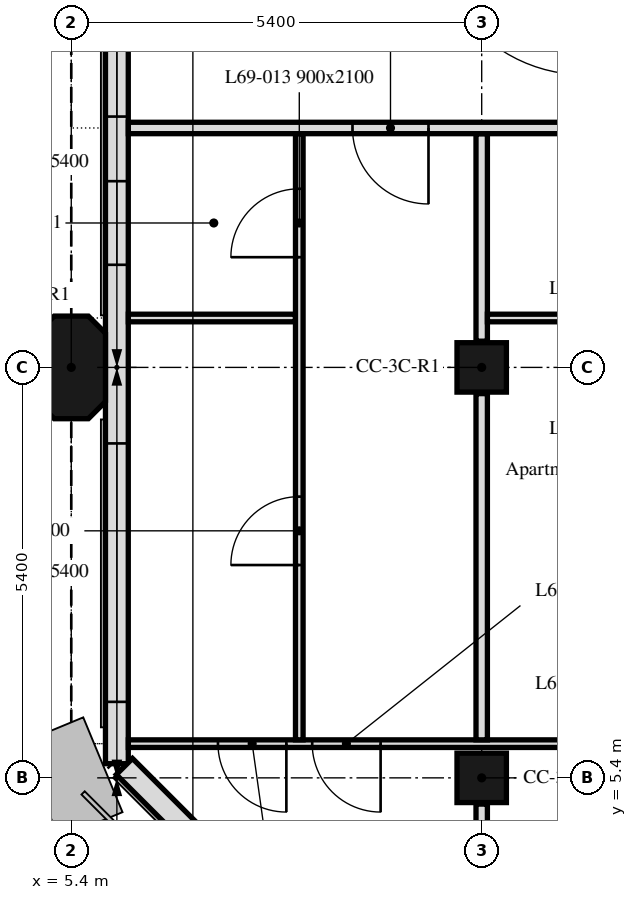
"""IFC4 building model, lengths in metres.
Left out: names, types, materials, properties, quantities, classifications, styles, units other than length and angle.
Written with IfcOpenShell. Run it as: python <this file> out.ifc"""

import sys

from ifc_helpers import new_model, si_unit, direction, frame, frame_2d, origin, origin_2d, place, context, subcontext, project, spatial, polyline, rectangle, outline, extrude, element, fill, save


model = new_model("IFC4")
c1 = context("Model", 3, precision=1e-05, world=origin(), true_north=direction((0.0, 1.0)))
c2 = subcontext(c1, "Body", "Model", "MODEL_VIEW")
j1 = project(units=[si_unit("LENGTHUNIT", "METRE"), si_unit("PLANEANGLEUNIT", "RADIAN")], contexts=[c1])
p1 = place(None, origin())
s1 = spatial("IfcSite", under=j1, at=p1, CompositionType="ELEMENT")
p2 = place(p1, origin())
s2 = spatial("IfcBuilding", under=s1, at=p2, CompositionType="ELEMENT")
p3 = place(p2, frame((0.0, 0.0, 281.8)))
s3 = spatial("IfcBuildingStorey", under=s2, at=p3, CompositionType="ELEMENT", Elevation=281.8)
p4 = place(p3, frame((10.8, 5.4, 0.0), z_axis=(0.0, 0.0, 1.0), x_axis=(1.0, 0.0, 0.0)))
e1 = element("IfcColumn", 1, at=p4, inside=s3, PredefinedType="COLUMN", context=c2, shape_type="SweptSolid", body=[
    extrude(rectangle(XDim=0.65, YDim=0.65, at=origin_2d()), origin(), (0.0, 0.0, 1.0), 3.0),
])
p5 = place(p3, frame((5.4, 10.8, 0.0), z_axis=(0.0, 0.0, 1.0), x_axis=(0.0, 1.0, 0.0)))
e2 = element("IfcColumn", 2, at=p5, inside=s3, PredefinedType="COLUMN", context=c2, shape_type="SweptSolid", body=[
    extrude(outline(polyline([(-0.45, -0.45), (0.45, -0.45), (0.675, -0.225), (0.675, 0.225), (0.45, 0.45), (-0.45, 0.45), (-0.675, 0.225), (-0.675, -0.225), (-0.45, -0.45)])), origin(), (0.0, 0.0, 1.0), 3.0),
])
p6 = place(p3, frame((10.8, 10.8, 0.0), z_axis=(0.0, 0.0, 1.0), x_axis=(1.0, 0.0, 0.0)))
e3 = element("IfcColumn", 3, at=p6, inside=s3, PredefinedType="COLUMN", context=c2, shape_type="SweptSolid", body=[
    extrude(rectangle(XDim=0.65, YDim=0.65, at=origin_2d()), origin(), (0.0, 0.0, 1.0), 3.0),
])
p7 = place(p3, frame((6.0, 16.2, 0.0), z_axis=(0.0, 0.0, 1.0), x_axis=(0.0, -1.0, 0.0)))
e4 = element("IfcWall", 4, at=p7, inside=s3, PredefinedType="SOLIDWALL", context=c2, shape_type="SweptSolid", body=[
    extrude(rectangle(XDim=10.614, YDim=0.3, at=frame_2d((5.307, 0.0))), origin(), (0.0, 0.0, 1.0), 3.0),
])
p8 = place(p7, frame((1.0, 0.0, 0.9)))
e5 = element("IfcOpeningElement", 5, at=p8, cuts=e4, PredefinedType="OPENING", context=c2, shape_type="SweptSolid", body=[
    extrude(rectangle(XDim=1.1, YDim=1.7, at=frame_2d((0.55, 0.85))), frame((0.0, 0.16, 0.0), z_axis=(0.0, -1.0, 0.0), x_axis=(1.0, 0.0, 0.0)), (0.0, 0.0, 1.0), 0.32),
])
p9 = place(p7, frame((2.95, 0.0, 0.9)))
e6 = element("IfcOpeningElement", 6, at=p9, cuts=e4, PredefinedType="OPENING", context=c2, shape_type="SweptSolid", body=[
    extrude(rectangle(XDim=1.1, YDim=1.7, at=frame_2d((0.55, 0.85))), frame((0.0, 0.16, 0.0), z_axis=(0.0, -1.0, 0.0), x_axis=(1.0, 0.0, 0.0)), (0.0, 0.0, 1.0), 0.32),
])
p10 = place(p7, frame((6.4, 0.0, 0.9)))
e7 = element("IfcOpeningElement", 7, at=p10, cuts=e4, PredefinedType="OPENING", context=c2, shape_type="SweptSolid", body=[
    extrude(rectangle(XDim=3.4, YDim=1.7, at=frame_2d((1.7, 0.85))), frame((0.0, 0.16, 0.0), z_axis=(0.0, -1.0, 0.0), x_axis=(1.0, 0.0, 0.0)), (0.0, 0.0, 1.0), 0.32),
])
p11 = place(p3, frame((6.099, 5.55, 0.0), z_axis=(0.0, 0.0, 1.0), x_axis=(0.707106781187, -0.707106781187, 0.0)))
e8 = element("IfcWall", 8, at=p11, inside=s3, PredefinedType="SOLIDWALL", context=c2, shape_type="SweptSolid", body=[
    extrude(rectangle(XDim=6.86, YDim=0.3, at=frame_2d((3.43, 0.0))), origin(), (0.0, 0.0, 1.0), 3.0),
])
p12 = place(p11, frame((1.28, 0.0, 0.9)))
e9 = element("IfcOpeningElement", 9, at=p12, cuts=e8, PredefinedType="OPENING", context=c2, shape_type="SweptSolid", body=[
    extrude(rectangle(XDim=1.1, YDim=1.7, at=frame_2d((0.55, 0.85))), frame((0.0, 0.16, 0.0), z_axis=(0.0, -1.0, 0.0), x_axis=(1.0, 0.0, 0.0)), (0.0, 0.0, 1.0), 0.32),
])
p13 = place(p11, frame((4.48, 0.0, 0.9)))
e10 = element("IfcOpeningElement", 10, at=p13, cuts=e8, PredefinedType="OPENING", context=c2, shape_type="SweptSolid", body=[
    extrude(rectangle(XDim=1.1, YDim=1.7, at=frame_2d((0.55, 0.85))), frame((0.0, 0.16, 0.0), z_axis=(0.0, -1.0, 0.0), x_axis=(1.0, 0.0, 0.0)), (0.0, 0.0, 1.0), 0.32),
])
p14 = place(p3, frame((10.8, 1.137, 0.0), z_axis=(0.0, 0.0, 1.0), x_axis=(0.0, 1.0, 0.0)))
e11 = element("IfcWall", 11, at=p14, inside=s3, PredefinedType="PARTITIONING", context=c2, shape_type="SweptSolid", body=[
    extrude(rectangle(XDim=3.918, YDim=0.15, at=frame_2d((1.959, 0.0))), origin(), (0.0, 0.0, 1.0), 3.0),
])
p15 = place(p3, frame((37.652, 5.85, 0.0), z_axis=(0.0, 0.0, 1.0), x_axis=(-1.0, 0.0, 0.0)))
e12 = element("IfcWall", 12, at=p15, inside=s3, PredefinedType="PARTITIONING", context=c2, shape_type="SweptSolid", body=[
    extrude(rectangle(XDim=31.501, YDim=0.1, at=frame_2d((15.75, 0.0))), origin(), (0.0, 0.0, 1.0), 2.4),
])
p16 = place(p15, frame((12.923, 0.0, 0.0)))
e13 = element("IfcOpeningElement", 13, at=p16, cuts=e12, PredefinedType="OPENING", context=c2, shape_type="SweptSolid", body=[
    extrude(rectangle(XDim=0.9, YDim=2.1, at=frame_2d((0.45, 1.05))), frame((0.0, 0.05, 0.0), z_axis=(0.0, -1.0, 0.0), x_axis=(1.0, 0.0, 0.0)), (0.0, 0.0, 1.0), 0.1),
])
p17 = place(p15, frame((29.422, 0.0, 0.0)))
e14 = element("IfcOpeningElement", 14, at=p17, cuts=e12, PredefinedType="OPENING", context=c2, shape_type="SweptSolid", body=[
    extrude(rectangle(XDim=0.9, YDim=2.1, at=frame_2d((0.45, 1.05))), frame((0.0, 0.05, 0.0), z_axis=(0.0, -1.0, 0.0), x_axis=(1.0, 0.0, 0.0)), (0.0, 0.0, 1.0), 0.1),
])
p18 = place(p15, frame((28.182, 0.0, 0.0)))
e15 = element("IfcOpeningElement", 15, at=p18, cuts=e12, PredefinedType="OPENING", context=c2, shape_type="SweptSolid", body=[
    extrude(rectangle(XDim=0.9, YDim=2.1, at=frame_2d((0.45, 1.05))), frame((0.0, 0.05, 0.0), z_axis=(0.0, -1.0, 0.0), x_axis=(1.0, 0.0, 0.0)), (0.0, 0.0, 1.0), 0.1),
])
p19 = place(p15, frame((23.942, 0.0, 0.0)))
e16 = element("IfcOpeningElement", 16, at=p19, cuts=e12, PredefinedType="OPENING", context=c2, shape_type="SweptSolid", body=[
    extrude(rectangle(XDim=0.9, YDim=2.1, at=frame_2d((0.45, 1.05))), frame((0.0, 0.05, 0.0), z_axis=(0.0, -1.0, 0.0), x_axis=(1.0, 0.0, 0.0)), (0.0, 0.0, 1.0), 0.1),
])
p20 = place(p15, frame((22.572, 0.0, 0.0)))
e17 = element("IfcOpeningElement", 17, at=p20, cuts=e12, PredefinedType="OPENING", context=c2, shape_type="SweptSolid", body=[
    extrude(rectangle(XDim=0.9, YDim=2.1, at=frame_2d((0.45, 1.05))), frame((0.0, 0.05, 0.0), z_axis=(0.0, -1.0, 0.0), x_axis=(1.0, 0.0, 0.0)), (0.0, 0.0, 1.0), 0.1),
])
p21 = place(p15, frame((19.466, 0.0, 0.0)))
e18 = element("IfcOpeningElement", 18, at=p21, cuts=e12, PredefinedType="OPENING", context=c2, shape_type="SweptSolid", body=[
    extrude(rectangle(XDim=0.9, YDim=2.1, at=frame_2d((0.45, 1.05))), frame((0.0, 0.05, 0.0), z_axis=(0.0, -1.0, 0.0), x_axis=(1.0, 0.0, 0.0)), (0.0, 0.0, 1.0), 0.1),
])
p22 = place(p15, frame((9.19, 0.0, 0.0)))
e19 = element("IfcOpeningElement", 19, at=p22, cuts=e12, PredefinedType="OPENING", context=c2, shape_type="SweptSolid", body=[
    extrude(rectangle(XDim=0.9, YDim=2.1, at=frame_2d((0.45, 1.05))), frame((0.0, 0.05, 0.0), z_axis=(0.0, -1.0, 0.0), x_axis=(1.0, 0.0, 0.0)), (0.0, 0.0, 1.0), 0.1),
])
p23 = place(p15, frame((7.512, 0.0, 0.0)))
e20 = element("IfcOpeningElement", 20, at=p23, cuts=e12, PredefinedType="OPENING", context=c2, shape_type="SweptSolid", body=[
    extrude(rectangle(XDim=0.9, YDim=2.1, at=frame_2d((0.45, 1.05))), frame((0.0, 0.05, 0.0), z_axis=(0.0, -1.0, 0.0), x_axis=(1.0, 0.0, 0.0)), (0.0, 0.0, 1.0), 0.1),
])
p24 = place(p15, frame((2.952, 0.0, 0.0)))
e21 = element("IfcOpeningElement", 21, at=p24, cuts=e12, PredefinedType="OPENING", context=c2, shape_type="SweptSolid", body=[
    extrude(rectangle(XDim=0.9, YDim=2.1, at=frame_2d((0.45, 1.05))), frame((0.0, 0.05, 0.0), z_axis=(0.0, -1.0, 0.0), x_axis=(1.0, 0.0, 0.0)), (0.0, 0.0, 1.0), 0.1),
])
p25 = place(p15, frame((18.096, 0.0, 0.0)))
e22 = element("IfcOpeningElement", 22, at=p25, cuts=e12, PredefinedType="OPENING", context=c2, shape_type="SweptSolid", body=[
    extrude(rectangle(XDim=0.9, YDim=2.1, at=frame_2d((0.45, 1.05))), frame((0.0, 0.05, 0.0), z_axis=(0.0, -1.0, 0.0), x_axis=(1.0, 0.0, 0.0)), (0.0, 0.0, 1.0), 0.1),
])
p26 = place(p3, frame((8.35, 11.45, 0.0), z_axis=(0.0, 0.0, 1.0), x_axis=(-1.0, 0.0, 0.0)))
e23 = element("IfcWall", 23, at=p26, inside=s3, PredefinedType="PARTITIONING", context=c2, shape_type="SweptSolid", body=[
    extrude(rectangle(XDim=2.199, YDim=0.1, at=frame_2d((1.1, 0.0))), origin(), (0.0, 0.0, 1.0), 3.0),
])
p27 = place(p3, frame((8.4, 5.9, 0.0), z_axis=(0.0, 0.0, 1.0), x_axis=(0.0, 1.0, 0.0)))
e24 = element("IfcWall", 24, at=p27, inside=s3, PredefinedType="PARTITIONING", context=c2, shape_type="SweptSolid", body=[
    extrude(rectangle(XDim=7.975, YDim=0.1, at=frame_2d((3.988, 0.0))), origin(), (0.0, 0.0, 1.0), 3.0),
])
p28 = place(p27, frame((6.35, 0.0, 0.0)))
e25 = element("IfcOpeningElement", 25, at=p28, cuts=e24, PredefinedType="OPENING", context=c2, shape_type="SweptSolid", body=[
    extrude(rectangle(XDim=0.9, YDim=2.1, at=frame_2d((0.45, 1.05))), frame((0.0, 0.05, 0.0), z_axis=(0.0, -1.0, 0.0), x_axis=(1.0, 0.0, 0.0)), (0.0, 0.0, 1.0), 0.1),
])
p29 = place(p27, frame((2.3, 0.0, 0.0)))
e26 = element("IfcOpeningElement", 26, at=p29, cuts=e24, PredefinedType="OPENING", context=c2, shape_type="SweptSolid", body=[
    extrude(rectangle(XDim=0.9, YDim=2.1, at=frame_2d((0.45, 1.05))), frame((0.0, 0.05, 0.0), z_axis=(0.0, -1.0, 0.0), x_axis=(1.0, 0.0, 0.0)), (0.0, 0.0, 1.0), 0.1),
])
p30 = place(p3, frame((10.8, 5.9, 0.0), z_axis=(0.0, 0.0, 1.0), x_axis=(0.0, 1.0, 0.0)))
e27 = element("IfcWall", 27, at=p30, inside=s3, PredefinedType="PARTITIONING", context=c2, shape_type="SweptSolid", body=[
    extrude(rectangle(XDim=4.555, YDim=0.15, at=frame_2d((2.278, 0.0))), origin(), (0.0, 0.0, 1.0), 3.0),
])
p31 = place(p3, frame((10.8, 11.145, 0.0), z_axis=(0.0, 0.0, 1.0), x_axis=(0.0, 1.0, 0.0)))
e28 = element("IfcWall", 28, at=p31, inside=s3, PredefinedType="PARTITIONING", context=c2, shape_type="SweptSolid", body=[
    extrude(rectangle(XDim=2.73, YDim=0.15, at=frame_2d((1.365, 0.0))), origin(), (0.0, 0.0, 1.0), 3.0),
])
p32 = place(p3, frame((13.96, 11.45, 0.0), z_axis=(0.0, 0.0, 1.0), x_axis=(-1.0, 0.0, 0.0)))
e29 = element("IfcWall", 29, at=p32, inside=s3, PredefinedType="PARTITIONING", context=c2, shape_type="SweptSolid", body=[
    extrude(rectangle(XDim=3.085, YDim=0.1, at=frame_2d((1.542, 0.0))), origin(), (0.0, 0.0, 1.0), 3.0),
])
p33 = place(p3, frame((47.849, 13.95, 0.0), z_axis=(0.0, 0.0, 1.0), x_axis=(-1.0, 0.0, 0.0)))
e30 = element("IfcWall", 30, at=p33, inside=s3, PredefinedType="PARTITIONING", context=c2, shape_type="SweptSolid", body=[
    extrude(rectangle(XDim=41.698, YDim=0.15, at=frame_2d((20.849, 0.0))), origin(), (0.0, 0.0, 1.0), 2.4),
])
p34 = place(p33, frame((37.749, 0.0, 0.0)))
e31 = element("IfcOpeningElement", 31, at=p34, cuts=e30, PredefinedType="OPENING", context=c2, shape_type="SweptSolid", body=[
    extrude(rectangle(XDim=1.0, YDim=2.1, at=frame_2d((0.5, 1.05))), frame((0.0, 0.075, 0.0), z_axis=(0.0, -1.0, 0.0), x_axis=(1.0, 0.0, 0.0)), (0.0, 0.0, 1.0), 0.15),
])
p35 = place(p33, frame((32.244, 0.0, 0.0)))
e32 = element("IfcOpeningElement", 32, at=p35, cuts=e30, PredefinedType="OPENING", context=c2, shape_type="SweptSolid", body=[
    extrude(rectangle(XDim=1.0, YDim=2.1, at=frame_2d((0.5, 1.05))), frame((0.0, 0.075, 0.0), z_axis=(0.0, -1.0, 0.0), x_axis=(1.0, 0.0, 0.0)), (0.0, 0.0, 1.0), 0.15),
])
p36 = place(p33, frame((27.735, 0.0, 0.0)))
e33 = element("IfcOpeningElement", 33, at=p36, cuts=e30, PredefinedType="OPENING", context=c2, shape_type="SweptSolid", body=[
    extrude(rectangle(XDim=1.0, YDim=2.1, at=frame_2d((0.5, 1.05))), frame((0.0, 0.075, 0.0), z_axis=(0.0, -1.0, 0.0), x_axis=(1.0, 0.0, 0.0)), (0.0, 0.0, 1.0), 0.15),
])
p37 = place(p33, frame((8.347, 0.0, 0.0)))
e34 = element("IfcOpeningElement", 34, at=p37, cuts=e30, PredefinedType="OPENING", context=c2, shape_type="SweptSolid", body=[
    extrude(rectangle(XDim=1.0, YDim=2.1, at=frame_2d((0.5, 1.05))), frame((0.0, 0.075, 0.0), z_axis=(0.0, -1.0, 0.0), x_axis=(1.0, 0.0, 0.0)), (0.0, 0.0, 1.0), 0.15),
])
p38 = place(p8, origin())
e35 = element("IfcWindow", 35, at=p38, inside=s3, PartitioningType="SINGLE_PANEL", PredefinedType="WINDOW", context=c2, shape_type="SweptSolid", body=[
    extrude(rectangle(XDim=1.1, YDim=1.7, at=frame_2d((0.55, 0.85))), frame((0.0, 0.03, 0.0), z_axis=(0.0, -1.0, 0.0), x_axis=(1.0, 0.0, 0.0)), (0.0, 0.0, 1.0), 0.06),
])
fill(e5, e35)
p39 = place(p9, origin())
e36 = element("IfcWindow", 36, at=p39, inside=s3, PartitioningType="SINGLE_PANEL", PredefinedType="WINDOW", context=c2, shape_type="SweptSolid", body=[
    extrude(rectangle(XDim=1.1, YDim=1.7, at=frame_2d((0.55, 0.85))), frame((0.0, 0.03, 0.0), z_axis=(0.0, -1.0, 0.0), x_axis=(1.0, 0.0, 0.0)), (0.0, 0.0, 1.0), 0.06),
])
fill(e6, e36)
p40 = place(p10, origin())
e37 = element("IfcWindow", 37, at=p40, inside=s3, PartitioningType="SINGLE_PANEL", PredefinedType="WINDOW", context=c2, shape_type="SweptSolid", body=[
    extrude(rectangle(XDim=3.4, YDim=1.7, at=frame_2d((1.7, 0.85))), frame((0.0, 0.03, 0.0), z_axis=(0.0, -1.0, 0.0), x_axis=(1.0, 0.0, 0.0)), (0.0, 0.0, 1.0), 0.06),
])
fill(e7, e37)
p41 = place(p28, origin())
e38 = element("IfcDoor", 38, at=p41, inside=s3, OperationType="SINGLE_SWING_RIGHT", PredefinedType="DOOR", context=c2, shape_type="SweptSolid", body=[
    extrude(rectangle(XDim=0.9, YDim=2.1, at=frame_2d((0.45, 1.05))), frame((0.0, 0.025, 0.0), z_axis=(0.0, -1.0, 0.0), x_axis=(1.0, 0.0, 0.0)), (0.0, 0.0, 1.0), 0.05),
])
fill(e25, e38)
p42 = place(p17, origin())
e39 = element("IfcDoor", 39, at=p42, inside=s3, OperationType="SINGLE_SWING_LEFT", PredefinedType="DOOR", context=c2, shape_type="SweptSolid", body=[
    extrude(rectangle(XDim=0.9, YDim=2.1, at=frame_2d((0.45, 1.05))), frame((0.0, 0.025, 0.0), z_axis=(0.0, -1.0, 0.0), x_axis=(1.0, 0.0, 0.0)), (0.0, 0.0, 1.0), 0.05),
])
fill(e14, e39)
p43 = place(p18, origin())
e40 = element("IfcDoor", 40, at=p43, inside=s3, OperationType="SINGLE_SWING_RIGHT", PredefinedType="DOOR", context=c2, shape_type="SweptSolid", body=[
    extrude(rectangle(XDim=0.9, YDim=2.1, at=frame_2d((0.45, 1.05))), frame((0.0, 0.025, 0.0), z_axis=(0.0, -1.0, 0.0), x_axis=(1.0, 0.0, 0.0)), (0.0, 0.0, 1.0), 0.05),
])
fill(e15, e40)
p44 = place(p29, origin())
e41 = element("IfcDoor", 41, at=p44, inside=s3, OperationType="SINGLE_SWING_LEFT", PredefinedType="DOOR", context=c2, shape_type="SweptSolid", body=[
    extrude(rectangle(XDim=0.9, YDim=2.1, at=frame_2d((0.45, 1.05))), frame((0.0, 0.025, 0.0), z_axis=(0.0, -1.0, 0.0), x_axis=(1.0, 0.0, 0.0)), (0.0, 0.0, 1.0), 0.05),
])
fill(e26, e41)
p45 = place(p34, origin())
e42 = element("IfcDoor", 42, at=p45, inside=s3, OperationType="SINGLE_SWING_LEFT", PredefinedType="DOOR", context=c2, shape_type="SweptSolid", body=[
    extrude(rectangle(XDim=1.0, YDim=2.1, at=frame_2d((0.5, 1.05))), frame((0.0, 0.025, 0.0), z_axis=(0.0, -1.0, 0.0), x_axis=(1.0, 0.0, 0.0)), (0.0, 0.0, 1.0), 0.05),
])
fill(e31, e42)
save(model, sys.argv[1])
